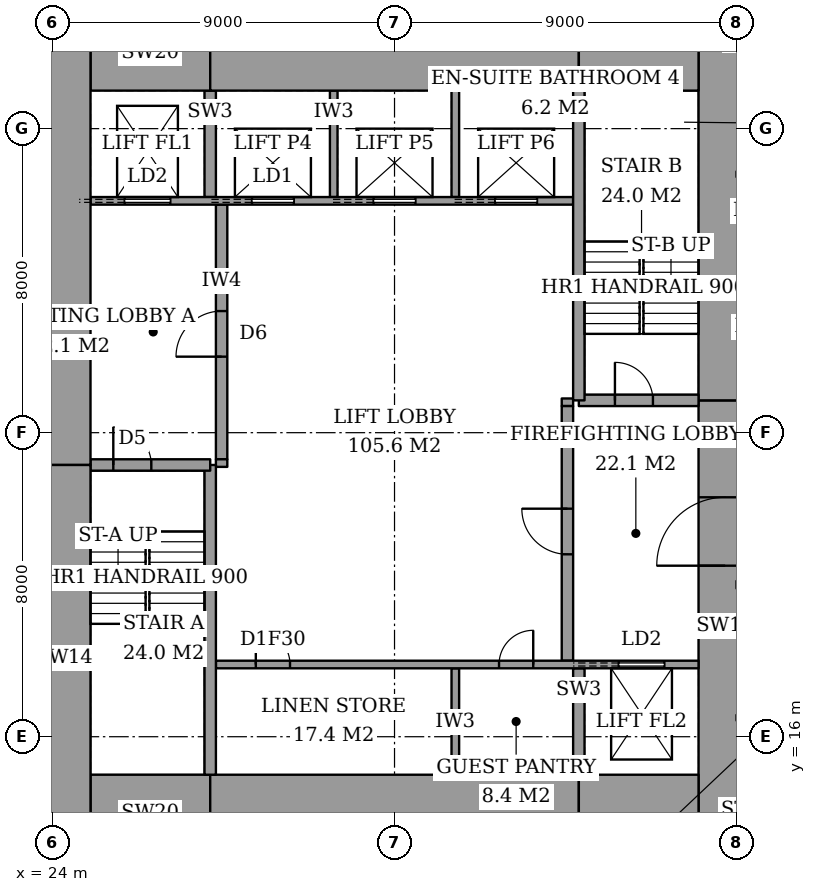
"""IFC4 building model, lengths in metres.
Left out: names, types, materials, properties, quantities, classifications, styles, units other than length and angle.
Written with IfcOpenShell. Run it as: python <this file> out.ifc"""

import sys

from ifc_helpers import new_model, si_unit, direction, frame, frame_2d, origin, place, context, subcontext, project, spatial, rectangle, extrude, element, fill, save


model = new_model("IFC4")
c1 = context("Model", 3, precision=1e-05, world=origin(), true_north=direction((0.0, 1.0)))
c2 = subcontext(c1, "Body", "Model", "MODEL_VIEW")
j1 = project(units=[si_unit("LENGTHUNIT", "METRE"), si_unit("PLANEANGLEUNIT", "RADIAN")], contexts=[c1])
p1 = place(None, origin())
s1 = spatial("IfcSite", under=j1, at=p1, CompositionType="ELEMENT")
p2 = place(p1, origin())
s2 = spatial("IfcBuilding", under=s1, at=p2, CompositionType="ELEMENT")
p3 = place(p2, frame((0.0, 0.0, 241.2)))
s3 = spatial("IfcBuildingStorey", under=s2, at=p3, CompositionType="ELEMENT", Elevation=241.2)
p4 = place(p3, frame((25.0, 14.0, 0.0), z_axis=(0.0, 0.0, 1.0), x_axis=(1.0, 0.0, 0.0)))
e1 = element("IfcWall", 1, at=p4, inside=s3, PredefinedType="SHEAR", context=c2, shape_type="SweptSolid", body=[
    extrude(rectangle(XDim=3.15, YDim=2.0, at=frame_2d((1.575, 0.0))), origin(), (0.0, 0.0, 1.0), 3.6),
])
p5 = place(p3, frame((28.15, 14.0, 0.0), z_axis=(0.0, 0.0, 1.0), x_axis=(1.0, 0.0, 0.0)))
e2 = element("IfcWall", 2, at=p5, inside=s3, PredefinedType="SHEAR", context=c2, shape_type="SweptSolid", body=[
    extrude(rectangle(XDim=9.7, YDim=2.0, at=frame_2d((4.85, 0.0))), origin(), (0.0, 0.0, 1.0), 3.6),
])
for number, where, z_axis, x_axis in (
    (3, (37.85, 14.0, 0.0), (0.0, 0.0, 1.0), (1.0, 0.0, 0.0)),
    (4, (25.0, 34.0, 0.0), (0.0, 0.0, 1.0), (1.0, 0.0, 0.0)),
):
    element("IfcWall", number, at=place(p3, frame(where, z_axis=z_axis, x_axis=x_axis)), inside=s3, PredefinedType="SHEAR", context=c2, shape_type="SweptSolid", body=[
        extrude(rectangle(XDim=3.15, YDim=2.0, at=frame_2d((1.575, 0.0))), origin(), (0.0, 0.0, 1.0), 3.6),
    ])
p6 = place(p3, frame((28.15, 34.0, 0.0), z_axis=(0.0, 0.0, 1.0), x_axis=(1.0, 0.0, 0.0)))
e5 = element("IfcWall", 5, at=p6, inside=s3, PredefinedType="SHEAR", context=c2, shape_type="SweptSolid", body=[
    extrude(rectangle(XDim=9.7, YDim=2.0, at=frame_2d((4.85, 0.0))), origin(), (0.0, 0.0, 1.0), 3.6),
])
p7 = place(p3, frame((37.85, 34.0, 0.0), z_axis=(0.0, 0.0, 1.0), x_axis=(1.0, 0.0, 0.0)))
e6 = element("IfcWall", 6, at=p7, inside=s3, PredefinedType="SHEAR", context=c2, shape_type="SweptSolid", body=[
    extrude(rectangle(XDim=3.15, YDim=2.0, at=frame_2d((1.575, 0.0))), origin(), (0.0, 0.0, 1.0), 3.6),
])
p8 = place(p3, frame((24.3, 13.0, 0.0), z_axis=(0.0, 0.0, 1.0), x_axis=(0.0, 1.0, 0.0)))
e7 = element("IfcWall", 7, at=p8, inside=s3, PredefinedType="SHEAR", context=c2, shape_type="SweptSolid", body=[
    extrude(rectangle(XDim=10.15, YDim=1.4, at=frame_2d((5.075, 0.0))), origin(), (0.0, 0.0, 1.0), 3.6),
])
p9 = place(p3, frame((24.3, 23.15, 0.0), z_axis=(0.0, 0.0, 1.0), x_axis=(0.0, 1.0, 0.0)))
e8 = element("IfcWall", 8, at=p9, inside=s3, PredefinedType="SHEAR", context=c2, shape_type="SweptSolid", body=[
    extrude(rectangle(XDim=11.85, YDim=1.4, at=frame_2d((5.925, 0.0))), origin(), (0.0, 0.0, 1.0), 3.6),
])
p10 = place(p3, frame((41.7, 13.0, 0.0), z_axis=(0.0, 0.0, 1.0), x_axis=(0.0, 1.0, 0.0)))
e9 = element("IfcWall", 9, at=p10, inside=s3, PredefinedType="SHEAR", context=c2, shape_type="SweptSolid", body=[
    extrude(rectangle(XDim=11.85, YDim=1.4, at=frame_2d((5.925, 0.0))), origin(), (0.0, 0.0, 1.0), 3.6),
])
p11 = place(p10, frame((7.5, 0.0, 0.0)))
e10 = element("IfcOpeningElement", 10, at=p11, cuts=e9, PredefinedType="OPENING", context=c2, shape_type="SweptSolid", body=[
    extrude(rectangle(XDim=1.8, YDim=2.4, at=frame_2d((0.9, 1.2))), frame((0.0, 0.71, 0.0), z_axis=(0.0, -1.0, 0.0), x_axis=(1.0, 0.0, 0.0)), (0.0, 0.0, 1.0), 1.42),
])
p12 = place(p3, frame((41.7, 24.85, 0.0), z_axis=(0.0, 0.0, 1.0), x_axis=(0.0, 1.0, 0.0)))
e11 = element("IfcWall", 11, at=p12, inside=s3, PredefinedType="SHEAR", context=c2, shape_type="SweptSolid", body=[
    extrude(rectangle(XDim=10.15, YDim=1.4, at=frame_2d((5.075, 0.0))), origin(), (0.0, 0.0, 1.0), 3.6),
])
p13 = place(p3, frame((28.15, 15.0, 0.0), z_axis=(0.0, 0.0, 1.0), x_axis=(0.0, 1.0, 0.0)))
e12 = element("IfcWall", 12, at=p13, inside=s3, PredefinedType="SHEAR", context=c2, shape_type="SweptSolid", body=[
    extrude(rectangle(XDim=8.15, YDim=0.3, at=frame_2d((4.075, 0.0))), origin(), (0.0, 0.0, 1.0), 3.6),
])
p14 = place(p3, frame((25.0, 23.15, 0.0), z_axis=(0.0, 0.0, 1.0), x_axis=(1.0, 0.0, 0.0)))
e13 = element("IfcWall", 13, at=p14, inside=s3, PredefinedType="SHEAR", context=c2, shape_type="SweptSolid", body=[
    extrude(rectangle(XDim=3.15, YDim=0.3, at=frame_2d((1.575, 0.0))), origin(), (0.0, 0.0, 1.0), 3.6),
])
p15 = place(p14, frame((0.6, 0.0, 0.0)))
e14 = element("IfcOpeningElement", 14, at=p15, cuts=e13, PredefinedType="OPENING", context=c2, shape_type="SweptSolid", body=[
    extrude(rectangle(XDim=1.0, YDim=2.1, at=frame_2d((0.5, 1.05))), frame((0.0, 0.16, 0.0), z_axis=(0.0, -1.0, 0.0), x_axis=(1.0, 0.0, 0.0)), (0.0, 0.0, 1.0), 0.32),
])
p16 = place(p3, frame((37.85, 24.85, 0.0), z_axis=(0.0, 0.0, 1.0), x_axis=(0.0, 1.0, 0.0)))
e15 = element("IfcWall", 15, at=p16, inside=s3, PredefinedType="SHEAR", context=c2, shape_type="SweptSolid", body=[
    extrude(rectangle(XDim=8.15, YDim=0.3, at=frame_2d((4.075, 0.0))), origin(), (0.0, 0.0, 1.0), 3.6),
])
p17 = place(p3, frame((37.85, 24.85, 0.0), z_axis=(0.0, 0.0, 1.0), x_axis=(1.0, 0.0, 0.0)))
e16 = element("IfcWall", 16, at=p17, inside=s3, PredefinedType="SHEAR", context=c2, shape_type="SweptSolid", body=[
    extrude(rectangle(XDim=3.15, YDim=0.3, at=frame_2d((1.575, 0.0))), origin(), (0.0, 0.0, 1.0), 3.6),
])
p18 = place(p17, frame((0.95, 0.0, 0.0)))
e17 = element("IfcOpeningElement", 17, at=p18, cuts=e16, PredefinedType="OPENING", context=c2, shape_type="SweptSolid", body=[
    extrude(rectangle(XDim=1.0, YDim=2.1, at=frame_2d((0.5, 1.05))), frame((0.0, 0.16, 0.0), z_axis=(0.0, -1.0, 0.0), x_axis=(1.0, 0.0, 0.0)), (0.0, 0.0, 1.0), 0.32),
])
p19 = place(p3, frame((28.45, 23.3, 0.0), z_axis=(0.0, 0.0, 1.0), x_axis=(0.0, 1.0, 0.0)))
e18 = element("IfcWall", 18, at=p19, inside=s3, PredefinedType="PARTITIONING", context=c2, shape_type="SweptSolid", body=[
    extrude(rectangle(XDim=6.7, YDim=0.3, at=frame_2d((3.35, 0.0))), origin(), (0.0, 0.0, 1.0), 3.6),
])
p20 = place(p19, frame((2.7, 0.0, 0.0)))
e19 = element("IfcOpeningElement", 19, at=p20, cuts=e18, PredefinedType="OPENING", context=c2, shape_type="SweptSolid", body=[
    extrude(rectangle(XDim=1.2, YDim=2.1, at=frame_2d((0.6, 1.05))), frame((0.0, 0.16, 0.0), z_axis=(0.0, -1.0, 0.0), x_axis=(1.0, 0.0, 0.0)), (0.0, 0.0, 1.0), 0.32),
])
p21 = place(p3, frame((37.55, 18.0, 0.0), z_axis=(0.0, 0.0, 1.0), x_axis=(0.0, 1.0, 0.0)))
e20 = element("IfcWall", 20, at=p21, inside=s3, PredefinedType="PARTITIONING", context=c2, shape_type="SweptSolid", body=[
    extrude(rectangle(XDim=6.7, YDim=0.3, at=frame_2d((3.35, 0.0))), origin(), (0.0, 0.0, 1.0), 3.6),
])
p22 = place(p21, frame((2.8, 0.0, 0.0)))
e21 = element("IfcOpeningElement", 21, at=p22, cuts=e20, PredefinedType="OPENING", context=c2, shape_type="SweptSolid", body=[
    extrude(rectangle(XDim=1.2, YDim=2.1, at=frame_2d((0.6, 1.05))), frame((0.0, 0.16, 0.0), z_axis=(0.0, -1.0, 0.0), x_axis=(1.0, 0.0, 0.0)), (0.0, 0.0, 1.0), 0.32),
])
p23 = place(p3, frame((28.3, 17.9, 0.0), z_axis=(0.0, 0.0, 1.0), x_axis=(1.0, 0.0, 0.0)))
e22 = element("IfcWall", 22, at=p23, inside=s3, PredefinedType="PARTITIONING", context=c2, shape_type="SweptSolid", body=[
    extrude(rectangle(XDim=12.7, YDim=0.2, at=frame_2d((6.35, 0.0))), origin(), (0.0, 0.0, 1.0), 3.6),
])
p24 = place(p23, frame((1.05, 0.0, 0.0)))
e23 = element("IfcOpeningElement", 23, at=p24, cuts=e22, PredefinedType="OPENING", context=c2, shape_type="SweptSolid", body=[
    extrude(rectangle(XDim=0.9, YDim=2.1, at=frame_2d((0.45, 1.05))), frame((0.0, 0.11, 0.0), z_axis=(0.0, -1.0, 0.0), x_axis=(1.0, 0.0, 0.0)), (0.0, 0.0, 1.0), 0.22),
])
p25 = place(p23, frame((7.45, 0.0, 0.0)))
e24 = element("IfcOpeningElement", 24, at=p25, cuts=e22, PredefinedType="OPENING", context=c2, shape_type="SweptSolid", body=[
    extrude(rectangle(XDim=0.9, YDim=2.1, at=frame_2d((0.45, 1.05))), frame((0.0, 0.11, 0.0), z_axis=(0.0, -1.0, 0.0), x_axis=(1.0, 0.0, 0.0)), (0.0, 0.0, 1.0), 0.22),
])
p26 = place(p23, frame((10.6, 0.0, 0.0)))
e25 = element("IfcOpeningElement", 25, at=p26, cuts=e22, PredefinedType="OPENING", context=c2, shape_type="SweptSolid", body=[
    extrude(rectangle(XDim=1.2, YDim=2.1, at=frame_2d((0.6, 1.05))), frame((0.0, 0.11, 0.0), z_axis=(0.0, -1.0, 0.0), x_axis=(1.0, 0.0, 0.0)), (0.0, 0.0, 1.0), 0.22),
])
p27 = place(p3, frame((25.0, 30.1, 0.0), z_axis=(0.0, 0.0, 1.0), x_axis=(1.0, 0.0, 0.0)))
e26 = element("IfcWall", 26, at=p27, inside=s3, PredefinedType="PARTITIONING", context=c2, shape_type="SweptSolid", body=[
    extrude(rectangle(XDim=12.7, YDim=0.2, at=frame_2d((6.35, 0.0))), origin(), (0.0, 0.0, 1.0), 3.6),
])
p28 = place(p27, frame((4.25, 0.0, 0.0)))
e27 = element("IfcOpeningElement", 27, at=p28, cuts=e26, PredefinedType="OPENING", context=c2, shape_type="SweptSolid", body=[
    extrude(rectangle(XDim=1.1, YDim=2.1, at=frame_2d((0.55, 1.05))), frame((0.0, 0.11, 0.0), z_axis=(0.0, -1.0, 0.0), x_axis=(1.0, 0.0, 0.0)), (0.0, 0.0, 1.0), 0.22),
])
p29 = place(p27, frame((7.45, 0.0, 0.0)))
e28 = element("IfcOpeningElement", 28, at=p29, cuts=e26, PredefinedType="OPENING", context=c2, shape_type="SweptSolid", body=[
    extrude(rectangle(XDim=1.1, YDim=2.1, at=frame_2d((0.55, 1.05))), frame((0.0, 0.11, 0.0), z_axis=(0.0, -1.0, 0.0), x_axis=(1.0, 0.0, 0.0)), (0.0, 0.0, 1.0), 0.22),
])
p30 = place(p27, frame((10.65, 0.0, 0.0)))
e29 = element("IfcOpeningElement", 29, at=p30, cuts=e26, PredefinedType="OPENING", context=c2, shape_type="SweptSolid", body=[
    extrude(rectangle(XDim=1.1, YDim=2.1, at=frame_2d((0.55, 1.05))), frame((0.0, 0.11, 0.0), z_axis=(0.0, -1.0, 0.0), x_axis=(1.0, 0.0, 0.0)), (0.0, 0.0, 1.0), 0.22),
])
p31 = place(p27, frame((0.9, 0.0, 0.0)))
e30 = element("IfcOpeningElement", 30, at=p31, cuts=e26, PredefinedType="OPENING", context=c2, shape_type="SweptSolid", body=[
    extrude(rectangle(XDim=1.2, YDim=2.1, at=frame_2d((0.6, 1.05))), frame((0.0, 0.11, 0.0), z_axis=(0.0, -1.0, 0.0), x_axis=(1.0, 0.0, 0.0)), (0.0, 0.0, 1.0), 0.22),
])
p32 = place(p3, frame((34.6, 15.0, 0.0), z_axis=(0.0, 0.0, 1.0), x_axis=(0.0, 1.0, 0.0)))
e31 = element("IfcWall", 31, at=p32, inside=s3, PredefinedType="PARTITIONING", context=c2, shape_type="SweptSolid", body=[
    extrude(rectangle(XDim=2.8, YDim=0.2, at=frame_2d((1.4, 0.0))), origin(), (0.0, 0.0, 1.0), 3.6),
])
p33 = place(p3, frame((37.85, 15.0, 0.0), z_axis=(0.0, 0.0, 1.0), x_axis=(0.0, 1.0, 0.0)))
e32 = element("IfcWall", 32, at=p33, inside=s3, PredefinedType="SHEAR", context=c2, shape_type="SweptSolid", body=[
    extrude(rectangle(XDim=2.8, YDim=0.3, at=frame_2d((1.4, 0.0))), origin(), (0.0, 0.0, 1.0), 3.6),
])
for number, where, z_axis, x_axis in (
    (33, (31.4, 30.2, 0.0), (0.0, 0.0, 1.0), (0.0, 1.0, 0.0)),
    (34, (34.6, 30.2, 0.0), (0.0, 0.0, 1.0), (0.0, 1.0, 0.0)),
):
    element("IfcWall", number, at=place(p3, frame(where, z_axis=z_axis, x_axis=x_axis)), inside=s3, PredefinedType="PARTITIONING", context=c2, shape_type="SweptSolid", body=[
        extrude(rectangle(XDim=2.8, YDim=0.2, at=frame_2d((1.4, 0.0))), origin(), (0.0, 0.0, 1.0), 3.6),
    ])
p34 = place(p3, frame((28.15, 30.2, 0.0), z_axis=(0.0, 0.0, 1.0), x_axis=(0.0, 1.0, 0.0)))
e35 = element("IfcWall", 35, at=p34, inside=s3, PredefinedType="SHEAR", context=c2, shape_type="SweptSolid", body=[
    extrude(rectangle(XDim=2.8, YDim=0.3, at=frame_2d((1.4, 0.0))), origin(), (0.0, 0.0, 1.0), 3.6),
])
for number, where, z_axis, x_axis in (
    (36, (28.3, 23.2, 0.0), (0.0, 0.0, 1.0), (1.0, 0.0, 0.0)),
    (37, (37.4, 24.8, 0.0), (0.0, 0.0, 1.0), (1.0, 0.0, 0.0)),
):
    element("IfcWall", number, at=place(p3, frame(where, z_axis=z_axis, x_axis=x_axis)), inside=s3, PredefinedType="PARTITIONING", context=c2, shape_type="SweptSolid", body=[
        extrude(rectangle(XDim=0.3, YDim=0.2, at=frame_2d((0.15, 0.0))), origin(), (0.0, 0.0, 1.0), 3.6),
    ])
p35 = place(p15, origin())
e38 = element("IfcDoor", 38, at=p35, inside=s3, OperationType="SINGLE_SWING_RIGHT", PredefinedType="DOOR", context=c2, shape_type="SweptSolid", body=[
    extrude(rectangle(XDim=1.0, YDim=2.1, at=frame_2d((0.5, 1.05))), frame((0.0, 0.025, 0.0), z_axis=(0.0, -1.0, 0.0), x_axis=(1.0, 0.0, 0.0)), (0.0, 0.0, 1.0), 0.05),
])
fill(e14, e38)
p36 = place(p18, origin())
e39 = element("IfcDoor", 39, at=p36, inside=s3, OperationType="SINGLE_SWING_RIGHT", PredefinedType="DOOR", context=c2, shape_type="SweptSolid", body=[
    extrude(rectangle(XDim=1.0, YDim=2.1, at=frame_2d((0.5, 1.05))), frame((0.0, 0.025, 0.0), z_axis=(0.0, -1.0, 0.0), x_axis=(1.0, 0.0, 0.0)), (0.0, 0.0, 1.0), 0.05),
])
fill(e17, e39)
p37 = place(p20, origin())
e40 = element("IfcDoor", 40, at=p37, inside=s3, OperationType="SINGLE_SWING_RIGHT", PredefinedType="DOOR", context=c2, shape_type="SweptSolid", body=[
    extrude(rectangle(XDim=1.2, YDim=2.1, at=frame_2d((0.6, 1.05))), frame((0.0, 0.025, 0.0), z_axis=(0.0, -1.0, 0.0), x_axis=(1.0, 0.0, 0.0)), (0.0, 0.0, 1.0), 0.05),
])
fill(e19, e40)
p38 = place(p22, origin())
e41 = element("IfcDoor", 41, at=p38, inside=s3, OperationType="SINGLE_SWING_LEFT", PredefinedType="DOOR", context=c2, shape_type="SweptSolid", body=[
    extrude(rectangle(XDim=1.2, YDim=2.1, at=frame_2d((0.6, 1.05))), frame((0.0, 0.025, 0.0), z_axis=(0.0, -1.0, 0.0), x_axis=(1.0, 0.0, 0.0)), (0.0, 0.0, 1.0), 0.05),
])
fill(e21, e41)
p39 = place(p11, origin())
e42 = element("IfcDoor", 42, at=p39, inside=s3, OperationType="DOUBLE_DOOR_DOUBLE_SWING", PredefinedType="DOOR", context=c2, shape_type="SweptSolid", body=[
    extrude(rectangle(XDim=1.8, YDim=2.4, at=frame_2d((0.9, 1.2))), frame((0.0, 0.025, 0.0), z_axis=(0.0, -1.0, 0.0), x_axis=(1.0, 0.0, 0.0)), (0.0, 0.0, 1.0), 0.05),
])
fill(e10, e42)
p40 = place(p24, origin())
e43 = element("IfcDoor", 43, at=p40, inside=s3, OperationType="SINGLE_SWING_RIGHT", PredefinedType="DOOR", context=c2, shape_type="SweptSolid", body=[
    extrude(rectangle(XDim=0.9, YDim=2.1, at=frame_2d((0.45, 1.05))), frame((0.0, 0.025, 0.0), z_axis=(0.0, -1.0, 0.0), x_axis=(1.0, 0.0, 0.0)), (0.0, 0.0, 1.0), 0.05),
])
fill(e23, e43)
p41 = place(p25, origin())
e44 = element("IfcDoor", 44, at=p41, inside=s3, OperationType="SINGLE_SWING_LEFT", PredefinedType="DOOR", context=c2, shape_type="SweptSolid", body=[
    extrude(rectangle(XDim=0.9, YDim=2.1, at=frame_2d((0.45, 1.05))), frame((0.0, 0.025, 0.0), z_axis=(0.0, -1.0, 0.0), x_axis=(1.0, 0.0, 0.0)), (0.0, 0.0, 1.0), 0.05),
])
fill(e24, e44)
p42 = place(p28, origin())
e45 = element("IfcDoor", 45, at=p42, inside=s3, OperationType="SLIDING_TO_LEFT", PredefinedType="DOOR", context=c2, shape_type="SweptSolid", body=[
    extrude(rectangle(XDim=1.1, YDim=2.1, at=frame_2d((0.55, 1.05))), frame((0.0, 0.025, 0.0), z_axis=(0.0, -1.0, 0.0), x_axis=(1.0, 0.0, 0.0)), (0.0, 0.0, 1.0), 0.05),
])
fill(e27, e45)
p43 = place(p29, origin())
e46 = element("IfcDoor", 46, at=p43, inside=s3, OperationType="SLIDING_TO_LEFT", PredefinedType="DOOR", context=c2, shape_type="SweptSolid", body=[
    extrude(rectangle(XDim=1.1, YDim=2.1, at=frame_2d((0.55, 1.05))), frame((0.0, 0.025, 0.0), z_axis=(0.0, -1.0, 0.0), x_axis=(1.0, 0.0, 0.0)), (0.0, 0.0, 1.0), 0.05),
])
fill(e28, e46)
p44 = place(p30, origin())
e47 = element("IfcDoor", 47, at=p44, inside=s3, OperationType="SLIDING_TO_LEFT", PredefinedType="DOOR", context=c2, shape_type="SweptSolid", body=[
    extrude(rectangle(XDim=1.1, YDim=2.1, at=frame_2d((0.55, 1.05))), frame((0.0, 0.025, 0.0), z_axis=(0.0, -1.0, 0.0), x_axis=(1.0, 0.0, 0.0)), (0.0, 0.0, 1.0), 0.05),
])
fill(e29, e47)
p45 = place(p31, origin())
e48 = element("IfcDoor", 48, at=p45, inside=s3, OperationType="SLIDING_TO_LEFT", PredefinedType="DOOR", context=c2, shape_type="SweptSolid", body=[
    extrude(rectangle(XDim=1.2, YDim=2.1, at=frame_2d((0.6, 1.05))), frame((0.0, 0.025, 0.0), z_axis=(0.0, -1.0, 0.0), x_axis=(1.0, 0.0, 0.0)), (0.0, 0.0, 1.0), 0.05),
])
fill(e30, e48)
p46 = place(p26, origin())
e49 = element("IfcDoor", 49, at=p46, inside=s3, OperationType="SLIDING_TO_LEFT", PredefinedType="DOOR", context=c2, shape_type="SweptSolid", body=[
    extrude(rectangle(XDim=1.2, YDim=2.1, at=frame_2d((0.6, 1.05))), frame((0.0, 0.025, 0.0), z_axis=(0.0, -1.0, 0.0), x_axis=(1.0, 0.0, 0.0)), (0.0, 0.0, 1.0), 0.05),
])
fill(e25, e49)
save(model, sys.argv[1])
